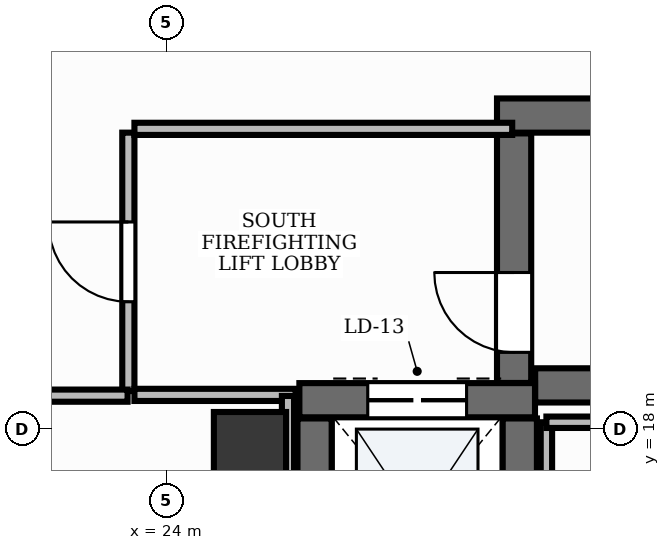
"""IFC4 building model, lengths in metres.
Left out: names, types, materials, properties, quantities, classifications, styles, units other than length and angle.
Written with IfcOpenShell. Run it as: python <this file> out.ifc"""

import sys

from ifc_helpers import new_model, si_unit, direction, frame, frame_2d, origin, origin_2d, place, context, subcontext, project, spatial, rectangle, extrude, element, fill, save


model = new_model("IFC4")
c1 = context("Model", 3, precision=1e-05, world=origin(), true_north=direction((0.0, 1.0)))
c2 = subcontext(c1, "Body", "Model", "MODEL_VIEW")
j1 = project(units=[si_unit("LENGTHUNIT", "METRE"), si_unit("PLANEANGLEUNIT", "RADIAN")], contexts=[c1])
p1 = place(None, origin())
s1 = spatial("IfcSite", under=j1, at=p1, CompositionType="ELEMENT")
p2 = place(p1, origin())
s2 = spatial("IfcBuilding", under=s1, at=p2, CompositionType="ELEMENT")
p3 = place(p2, frame((0.0, 0.0, 30.0)))
s3 = spatial("IfcBuildingStorey", under=s2, at=p3, CompositionType="ELEMENT", Elevation=30.0)
p4 = place(p3, frame((28.852, 18.575, 0.0), z_axis=(0.0, 0.0, 1.0), x_axis=(1.0, 0.0, 0.0)))
e1 = element("IfcWall", 1, at=p4, inside=s3, PredefinedType="SHEAR", context=c2, shape_type="SweptSolid", body=[
    extrude(rectangle(XDim=8.248, YDim=0.45, at=frame_2d((4.124, 0.0))), origin(), (0.0, 0.0, 1.0), 3.9),
])
p5 = place(p3, frame((28.35, 22.125, 0.0), z_axis=(0.0, 0.0, 1.0), x_axis=(1.0, 0.0, 0.0)))
e2 = element("IfcWall", 2, at=p5, inside=s3, PredefinedType="SHEAR", context=c2, shape_type="SweptSolid", body=[
    extrude(rectangle(XDim=8.75, YDim=0.45, at=frame_2d((4.375, 0.0))), origin(), (0.0, 0.0, 1.0), 3.9),
])
p6 = place(p3, frame((28.575, 18.607, 0.0), z_axis=(0.0, 0.0, 1.0), x_axis=(0.0, 1.0, 0.0)))
e3 = element("IfcWall", 3, at=p6, inside=s3, PredefinedType="SHEAR", context=c2, shape_type="SweptSolid", body=[
    extrude(rectangle(XDim=3.283, YDim=0.45, at=frame_2d((1.642, 0.0))), origin(), (0.0, 0.0, 1.0), 3.9),
])
p7 = place(p6, frame((0.403, 0.0, 0.0)))
e4 = element("IfcOpeningElement", 4, at=p7, cuts=e3, PredefinedType="OPENING", context=c2, shape_type="SweptSolid", body=[
    extrude(rectangle(XDim=1.05, YDim=2.15, at=frame_2d((0.525, 1.075))), frame((0.0, 0.24, 0.0), z_axis=(0.0, -1.0, 0.0), x_axis=(1.0, 0.0, 0.0)), (0.0, 0.0, 1.0), 0.48),
])
p8 = place(p3, frame((25.75, 18.38, 0.0), z_axis=(0.0, 0.0, 1.0), x_axis=(1.0, 0.0, 0.0)))
e5 = element("IfcWall", 5, at=p8, inside=s3, PredefinedType="SHEAR", context=c2, shape_type="SweptSolid", body=[
    extrude(rectangle(XDim=3.1, YDim=0.45, at=frame_2d((1.55, 0.0))), origin(), (0.0, 0.0, 1.0), 3.9),
])
p9 = place(p8, frame((0.9, 0.0, 0.0)))
e6 = element("IfcOpeningElement", 6, at=p9, cuts=e5, PredefinedType="OPENING", context=c2, shape_type="SweptSolid", body=[
    extrude(rectangle(XDim=1.3, YDim=2.2, at=frame_2d((0.65, 1.1))), frame((0.0, 0.24, 0.0), z_axis=(0.0, -1.0, 0.0), x_axis=(1.0, 0.0, 0.0)), (0.0, 0.0, 1.0), 0.48),
])
for number, where, z_axis, x_axis in (
    (7, (25.95, 15.44, 0.0), (0.0, 0.0, 1.0), (0.0, 1.0, 0.0)),
    (8, (28.65, 15.44, 0.0), (0.0, 0.0, 1.0), (0.0, 1.0, 0.0)),
):
    element("IfcWall", number, at=place(p3, frame(where, z_axis=z_axis, x_axis=x_axis)), inside=s3, PredefinedType="SHEAR", context=c2, shape_type="SweptSolid", body=[
        extrude(rectangle(XDim=2.7, YDim=0.45, at=frame_2d((1.35, 0.0))), origin(), (0.0, 0.0, 1.0), 3.9),
    ])
p10 = place(p3, frame((25.1, 17.75, -0.0), z_axis=(0.0, 0.0, 1.0), x_axis=(1.0, 0.0, 0.0)))
e9 = element("IfcColumn", 9, at=p10, inside=s3, PredefinedType="PILASTER", context=c2, shape_type="SweptSolid", body=[
    extrude(rectangle(XDim=0.95, YDim=0.95, at=origin_2d()), origin(), (0.0, 0.0, 1.0), 3.901),
])
p11 = place(p3, frame((23.5, 18.5, 0.0), z_axis=(0.0, 0.0, 1.0), x_axis=(0.0, 1.0, 0.0)))
e10 = element("IfcWall", 10, at=p11, inside=s3, PredefinedType="PARTITIONING", context=c2, shape_type="SweptSolid", body=[
    extrude(rectangle(XDim=3.4, YDim=0.16, at=frame_2d((1.7, 0.0))), origin(), (0.0, 0.0, 1.0), 2.91),
])
p12 = place(p11, frame((1.175, 0.0, 0.0)))
e11 = element("IfcOpeningElement", 11, at=p12, cuts=e10, PredefinedType="OPENING", context=c2, shape_type="SweptSolid", body=[
    extrude(rectangle(XDim=1.05, YDim=2.15, at=frame_2d((0.525, 1.075))), frame((0.0, 0.095, 0.0), z_axis=(0.0, -1.0, 0.0), x_axis=(1.0, 0.0, 0.0)), (0.0, 0.0, 1.0), 0.19),
])
p13 = place(p3, frame((23.58, 21.95, 0.0), z_axis=(0.0, 0.0, 1.0), x_axis=(1.0, 0.0, 0.0)))
e12 = element("IfcWall", 12, at=p13, inside=s3, PredefinedType="PARTITIONING", context=c2, shape_type="SweptSolid", body=[
    extrude(rectangle(XDim=4.97, YDim=0.16, at=frame_2d((2.485, 0.0))), origin(), (0.0, 0.0, 1.0), 2.91),
])
p14 = place(p3, frame((23.58, 18.45, 0.0), z_axis=(0.0, 0.0, 1.0), x_axis=(1.0, 0.0, 0.0)))
e13 = element("IfcWall", 13, at=p14, inside=s3, PredefinedType="PARTITIONING", context=c2, shape_type="SweptSolid", body=[
    extrude(rectangle(XDim=2.12, YDim=0.16, at=frame_2d((1.06, 0.0))), origin(), (0.0, 0.0, 1.0), 2.91),
])
p15 = place(p3, frame((17.011, 18.44, 0.0), z_axis=(0.0, 0.0, 1.0), x_axis=(1.0, 0.0, 0.0)))
e14 = element("IfcWall", 14, at=p15, inside=s3, PredefinedType="PARTITIONING", context=c2, shape_type="SweptSolid", body=[
    extrude(rectangle(XDim=6.479, YDim=0.16, at=frame_2d((3.24, 0.0))), origin(), (0.0, 0.0, 1.0), 2.91),
])
p16 = place(p15, frame((3.619, 0.0, 0.0)))
e15 = element("IfcOpeningElement", 15, at=p16, cuts=e14, PredefinedType="OPENING", context=c2, shape_type="SweptSolid", body=[
    extrude(rectangle(XDim=0.95, YDim=2.15, at=frame_2d((0.475, 1.075))), frame((0.0, 0.095, 0.0), z_axis=(0.0, -1.0, 0.0), x_axis=(1.0, 0.0, 0.0)), (0.0, 0.0, 1.0), 0.19),
])
p17 = place(p3, frame((25.6, 18.436, 0.0), z_axis=(0.0, 0.0, 1.0), x_axis=(0.0, -1.0, 0.0)))
e16 = element("IfcWall", 16, at=p17, inside=s3, PredefinedType="PARTITIONING", context=c2, shape_type="SweptSolid", body=[
    extrude(rectangle(XDim=3.482, YDim=0.16, at=frame_2d((1.741, 0.0))), origin(), (0.0, 0.0, 1.0), 2.91),
])
p18 = place(p3, frame((29.0, 14.954, 0.0), z_axis=(0.0, 0.0, 1.0), x_axis=(0.0, 1.0, 0.0)))
e17 = element("IfcWall", 17, at=p18, inside=s3, PredefinedType="PARTITIONING", context=c2, shape_type="SweptSolid", body=[
    extrude(rectangle(XDim=3.136, YDim=0.15, at=frame_2d((1.568, 0.0))), origin(), (0.0, 0.0, 1.0), 2.91),
])
p19 = place(p3, frame((29.0, 18.09, 0.0), z_axis=(0.0, 0.0, 1.0), x_axis=(1.0, 0.0, 0.0)))
e18 = element("IfcWall", 18, at=p19, inside=s3, PredefinedType="PARTITIONING", context=c2, shape_type="SweptSolid", body=[
    extrude(rectangle(XDim=8.35, YDim=0.15, at=frame_2d((4.175, 0.0))), origin(), (0.0, 0.0, 1.0), 2.91),
])
p20 = place(p7, origin())
e19 = element("IfcDoor", 19, at=p20, inside=s3, OperationType="SINGLE_SWING_RIGHT", PredefinedType="DOOR", context=c2, shape_type="SweptSolid", body=[
    extrude(rectangle(XDim=1.05, YDim=2.15, at=frame_2d((0.525, 1.075))), frame((0.0, 0.025, 0.0), z_axis=(0.0, -1.0, 0.0), x_axis=(1.0, 0.0, 0.0)), (0.0, 0.0, 1.0), 0.05),
])
fill(e4, e19)
p21 = place(p9, origin())
e20 = element("IfcDoor", 20, at=p21, inside=s3, OperationType="DOUBLE_DOOR_SLIDING", PredefinedType="DOOR", context=c2, shape_type="SweptSolid", body=[
    extrude(rectangle(XDim=1.3, YDim=2.2, at=frame_2d((0.65, 1.1))), frame((0.0, 0.025, 0.0), z_axis=(0.0, -1.0, 0.0), x_axis=(1.0, 0.0, 0.0)), (0.0, 0.0, 1.0), 0.05),
])
fill(e6, e20)
p22 = place(p12, origin())
e21 = element("IfcDoor", 21, at=p22, inside=s3, OperationType="SINGLE_SWING_RIGHT", PredefinedType="DOOR", context=c2, shape_type="SweptSolid", body=[
    extrude(rectangle(XDim=1.05, YDim=2.15, at=frame_2d((0.525, 1.075))), frame((0.0, 0.025, 0.0), z_axis=(0.0, -1.0, 0.0), x_axis=(1.0, 0.0, 0.0)), (0.0, 0.0, 1.0), 0.05),
])
fill(e11, e21)
save(model, sys.argv[1])
